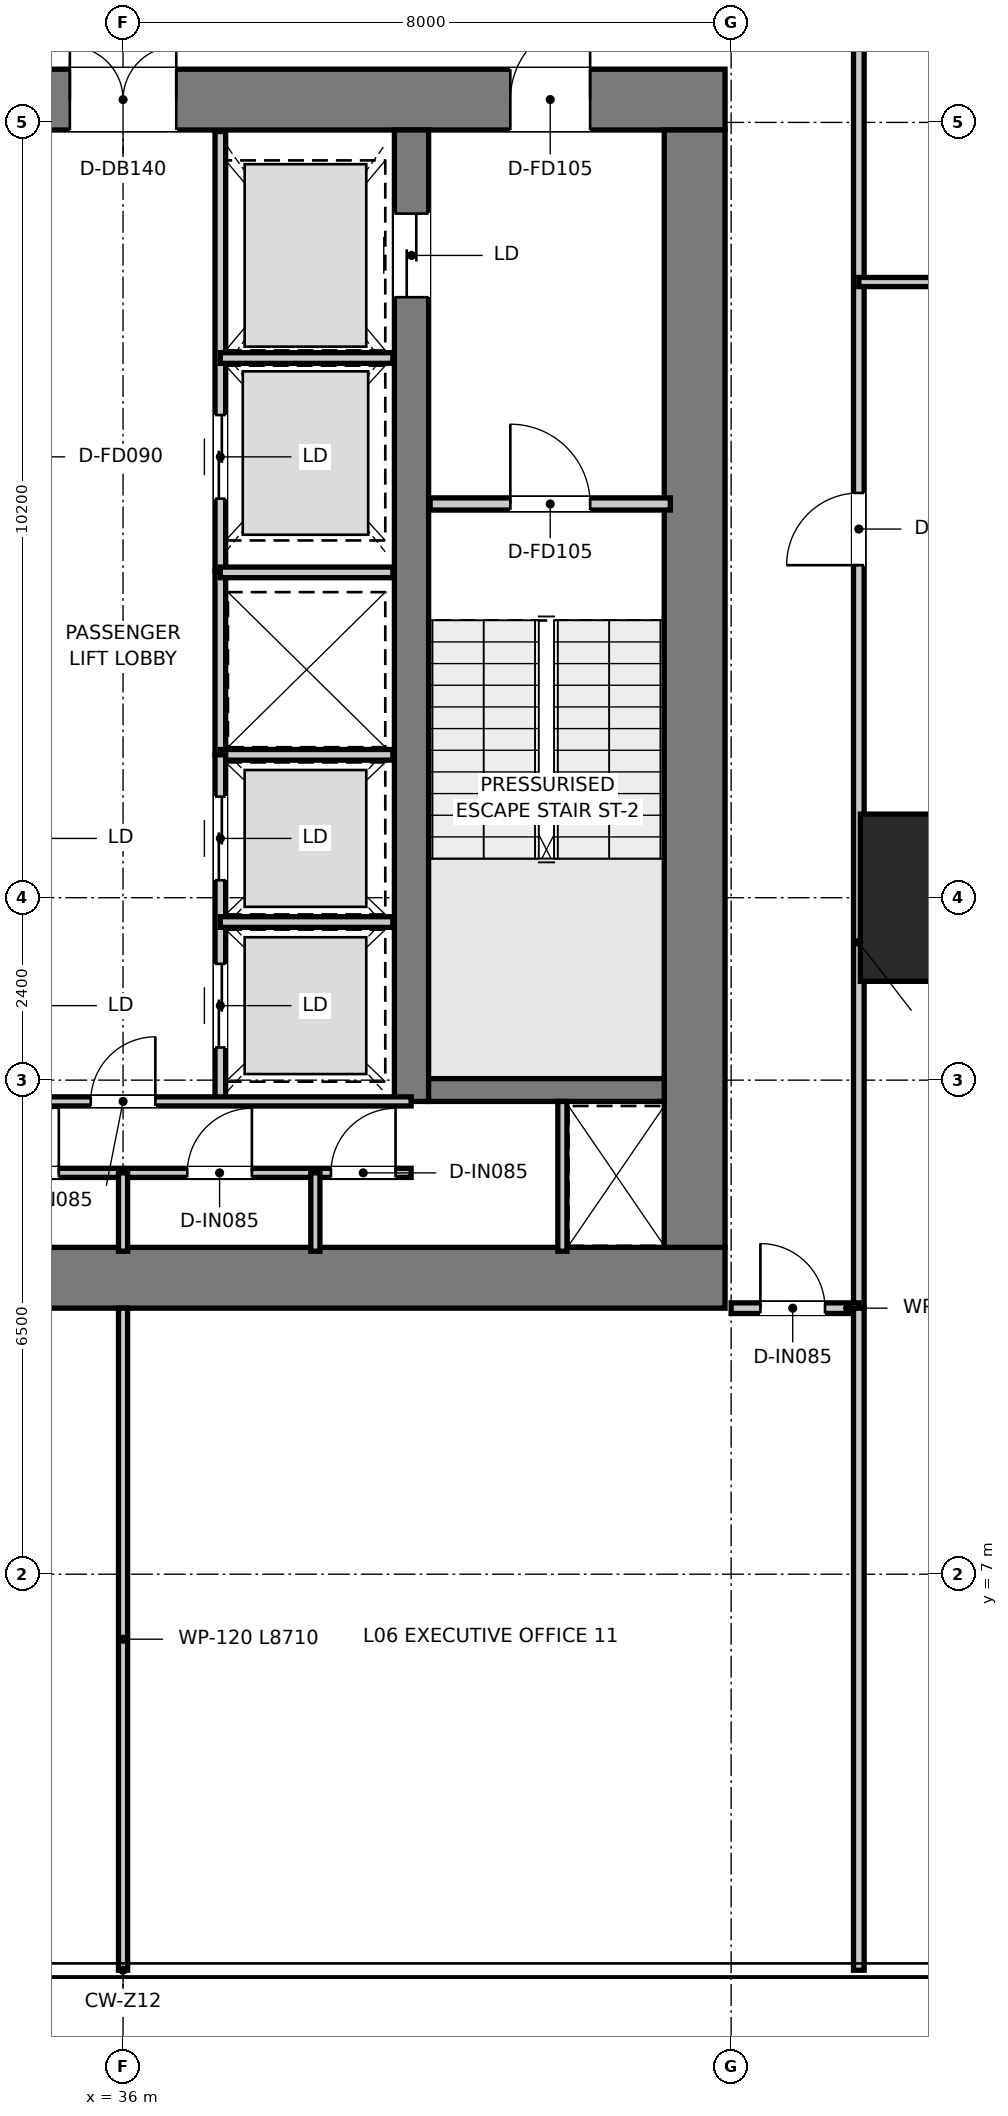
"""IFC4 building model, lengths in metres.
Left out: names, types, materials, properties, quantities, classifications, styles, units other than length and angle.
Written with IfcOpenShell. Run it as: python <this file> out.ifc"""

import sys

from ifc_helpers import new_model, si_unit, direction, frame, frame_2d, origin, origin_2d, place, context, subcontext, project, spatial, rectangle, extrude, source, transform, mapped, element, fill, save


model = new_model("IFC4")
c1 = context("Model", 3, precision=1e-05, world=origin(), true_north=direction((0.0, 1.0)))
c2 = subcontext(c1, "Body", "Model", "MODEL_VIEW")
j1 = project(units=[si_unit("LENGTHUNIT", "METRE"), si_unit("PLANEANGLEUNIT", "RADIAN")], contexts=[c1])
p1 = place(None, origin())
s1 = spatial("IfcSite", under=j1, at=p1, CompositionType="ELEMENT")
p2 = place(p1, origin())
s2 = spatial("IfcBuilding", under=s1, at=p2, CompositionType="ELEMENT")
p3 = place(p2, frame((0.0, 0.0, 28.95)))
s3 = spatial("IfcBuildingStorey", under=s2, at=p3, CompositionType="ELEMENT", Elevation=28.95)
p4 = place(p3, frame((28.08, 10.9, 0.0), z_axis=(0.0, 0.0, 1.0), x_axis=(1.0, 0.0, 0.0)))
e1 = element("IfcWall", 1, at=p4, inside=s3, PredefinedType="SHEAR", context=c2, shape_type="SweptSolid", body=[
    extrude(rectangle(XDim=15.84, YDim=0.8, at=frame_2d((7.92, 0.0))), origin(), (0.0, 0.0, 1.0), 3.95),
])
p5 = place(p3, frame((28.08, 26.4, 0.0), z_axis=(0.0, 0.0, 1.0), x_axis=(1.0, 0.0, 0.0)))
e2 = element("IfcWall", 2, at=p5, inside=s3, PredefinedType="SHEAR", context=c2, shape_type="SweptSolid", body=[
    extrude(rectangle(XDim=15.84, YDim=0.8, at=frame_2d((7.92, 0.0))), origin(), (0.0, 0.0, 1.0), 3.95),
])
p6 = place(p5, frame((7.22, 0.0, 0.0)))
e3 = element("IfcOpeningElement", 3, at=p6, cuts=e2, PredefinedType="OPENING", context=c2, shape_type="SweptSolid", body=[
    extrude(rectangle(XDim=1.4, YDim=2.2, at=frame_2d((0.7, 1.1))), frame((0.0, 0.41, 0.0), z_axis=(0.0, -1.0, 0.0), x_axis=(1.0, 0.0, 0.0)), (0.0, 0.0, 1.0), 0.82),
])
p7 = place(p5, frame((1.775, 0.0, 0.0)))
e4 = element("IfcOpeningElement", 4, at=p7, cuts=e2, PredefinedType="OPENING", context=c2, shape_type="SweptSolid", body=[
    extrude(rectangle(XDim=1.05, YDim=2.1, at=frame_2d((0.525, 1.05))), frame((0.0, 0.41, 0.0), z_axis=(0.0, -1.0, 0.0), x_axis=(1.0, 0.0, 0.0)), (0.0, 0.0, 1.0), 0.82),
])
p8 = place(p5, frame((13.015, 0.0, 0.0)))
e5 = element("IfcOpeningElement", 5, at=p8, cuts=e2, PredefinedType="OPENING", context=c2, shape_type="SweptSolid", body=[
    extrude(rectangle(XDim=1.05, YDim=2.1, at=frame_2d((0.525, 1.05))), frame((0.0, 0.41, 0.0), z_axis=(0.0, -1.0, 0.0), x_axis=(1.0, 0.0, 0.0)), (0.0, 0.0, 1.0), 0.82),
])
p9 = place(p3, frame((43.52, 11.3, 0.0), z_axis=(0.0, 0.0, 1.0), x_axis=(0.0, 1.0, 0.0)))
e6 = element("IfcWall", 6, at=p9, inside=s3, PredefinedType="SHEAR", context=c2, shape_type="SweptSolid", body=[
    extrude(rectangle(XDim=14.7, YDim=0.8, at=frame_2d((7.35, 0.0))), origin(), (0.0, 0.0, 1.0), 3.95),
])
p10 = place(p3, frame((39.795, 13.22, 0.0), z_axis=(0.0, 0.0, 1.0), x_axis=(0.0, 1.0, 0.0)))
e7 = element("IfcWall", 7, at=p10, inside=s3, PredefinedType="SHEAR", context=c2, shape_type="SweptSolid", body=[
    extrude(rectangle(XDim=12.78, YDim=0.45, at=frame_2d((6.39, 0.0))), origin(), (0.0, 0.0, 1.0), 3.95),
])
p11 = place(p10, frame((10.58, 0.0, 0.0)))
e8 = element("IfcOpeningElement", 8, at=p11, cuts=e7, PredefinedType="OPENING", context=c2, shape_type="SweptSolid", body=[
    extrude(rectangle(XDim=1.1, YDim=2.15, at=frame_2d((0.55, 1.075))), frame((0.0, 0.235, 0.0), z_axis=(0.0, -1.0, 0.0), x_axis=(1.0, 0.0, 0.0)), (0.0, 0.0, 1.0), 0.47),
])
p12 = place(p3, frame((40.02, 13.37, 0.0), z_axis=(0.0, 0.0, 1.0), x_axis=(1.0, 0.0, 0.0)))
e9 = element("IfcWall", 9, at=p12, inside=s3, PredefinedType="SHEAR", context=c2, shape_type="SweptSolid", body=[
    extrude(rectangle(XDim=3.1, YDim=0.3, at=frame_2d((1.55, 0.0))), origin(), (0.0, 0.0, 1.0), 3.95),
])
m1 = source(origin(), c2, "Body", "SweptSolid", [
    extrude(rectangle(XDim=2.2, YDim=2.2, at=origin_2d()), origin(), (0.0, 0.0, 1.0), 3.95),
])
p13 = place(p3, frame((46.8, 15.9, 0.0), z_axis=(0.0, 0.0, 1.0), x_axis=(1.0, 0.0, 0.0)))
e10 = element("IfcColumn", 10, at=p13, inside=s3, PredefinedType="USERDEFINED", context=c2, shape_type="MappedRepresentation", body=[
    mapped(m1, transform((0.0, 0.0, 0.0), x_axis=(1.0, 0.0, 0.0), y_axis=(0.0, 1.0, 0.0), z_axis=(0.0, 0.0, 1.0), scale=1.0)),
])
p14 = place(p3, frame((40.04, 21.08, 0.0), z_axis=(0.0, 0.0, 1.0), x_axis=(1.0, 0.0, 0.0)))
e11 = element("IfcWall", 11, at=p14, inside=s3, PredefinedType="PARTITIONING", context=c2, shape_type="SweptSolid", body=[
    extrude(rectangle(XDim=3.16, YDim=0.16, at=frame_2d((1.58, 0.0))), origin(), (0.0, 0.0, 1.0), 3.67),
])
p15 = place(p14, frame((1.055, 0.0, 0.0)))
e12 = element("IfcOpeningElement", 12, at=p15, cuts=e11, PredefinedType="OPENING", context=c2, shape_type="SweptSolid", body=[
    extrude(rectangle(XDim=1.05, YDim=2.1, at=frame_2d((0.525, 1.05))), frame((0.0, 0.09, 0.0), z_axis=(0.0, -1.0, 0.0), x_axis=(1.0, 0.0, 0.0)), (0.0, 0.0, 1.0), 0.18),
])
p16 = place(p3, frame((37.28, 20.2, 0.0), z_axis=(0.0, 0.0, 1.0), x_axis=(0.0, 1.0, 0.0)))
e13 = element("IfcWall", 13, at=p16, inside=s3, PredefinedType="PARTITIONING", context=c2, shape_type="SweptSolid", body=[
    extrude(rectangle(XDim=5.78, YDim=0.14, at=frame_2d((2.89, 0.0))), origin(), (0.0, 0.0, 1.0), 2.47),
])
p17 = place(p16, frame((0.95, 0.0, 0.0)))
e14 = element("IfcOpeningElement", 14, at=p17, cuts=e13, PredefinedType="OPENING", context=c2, shape_type="SweptSolid", body=[
    extrude(rectangle(XDim=1.1, YDim=2.15, at=frame_2d((0.55, 1.075))), frame((0.0, 0.08, 0.0), z_axis=(0.0, -1.0, 0.0), x_axis=(1.0, 0.0, 0.0)), (0.0, 0.0, 1.0), 0.16),
])
p18 = place(p3, frame((37.28, 23.0, 0.0), z_axis=(0.0, 0.0, 1.0), x_axis=(1.0, 0.0, 0.0)))
e15 = element("IfcWall", 15, at=p18, inside=s3, PredefinedType="PARTITIONING", context=c2, shape_type="SweptSolid", body=[
    extrude(rectangle(XDim=2.27, YDim=0.14, at=frame_2d((1.135, 0.0))), origin(), (0.0, 0.0, 1.0), 2.47),
])
p19 = place(p3, frame((37.28, 17.78, 0.0), z_axis=(0.0, 0.0, 1.0), x_axis=(0.0, 1.0, 0.0)))
e16 = element("IfcWall", 16, at=p19, inside=s3, PredefinedType="PARTITIONING", context=c2, shape_type="SweptSolid", body=[
    extrude(rectangle(XDim=2.42, YDim=0.14, at=frame_2d((1.21, 0.0))), origin(), (0.0, 0.0, 1.0), 3.67),
])
for number, where, z_axis, x_axis in (
    (17, (37.28, 17.78, 0.0), (0.0, 0.0, 1.0), (1.0, 0.0, 0.0)),
    (18, (37.28, 20.18, 0.0), (0.0, 0.0, 1.0), (1.0, 0.0, 0.0)),
):
    element("IfcWall", number, at=place(p3, frame(where, z_axis=z_axis, x_axis=x_axis)), inside=s3, PredefinedType="PARTITIONING", context=c2, shape_type="SweptSolid", body=[
        extrude(rectangle(XDim=2.27, YDim=0.14, at=frame_2d((1.135, 0.0))), origin(), (0.0, 0.0, 1.0), 3.67),
    ])
p20 = place(p3, frame((37.28, 13.22, 0.0), z_axis=(0.0, 0.0, 1.0), x_axis=(0.0, 1.0, 0.0)))
e19 = element("IfcWall", 19, at=p20, inside=s3, PredefinedType="PARTITIONING", context=c2, shape_type="SweptSolid", body=[
    extrude(rectangle(XDim=4.56, YDim=0.14, at=frame_2d((2.28, 0.0))), origin(), (0.0, 0.0, 1.0), 3.67),
])
p21 = place(p20, frame((0.71, 0.0, 0.0)))
e20 = element("IfcOpeningElement", 20, at=p21, cuts=e19, PredefinedType="OPENING", context=c2, shape_type="SweptSolid", body=[
    extrude(rectangle(XDim=1.1, YDim=2.15, at=frame_2d((0.55, 1.075))), frame((0.0, 0.08, 0.0), z_axis=(0.0, -1.0, 0.0), x_axis=(1.0, 0.0, 0.0)), (0.0, 0.0, 1.0), 0.16),
])
p22 = place(p20, frame((2.91, 0.0, 0.0)))
e21 = element("IfcOpeningElement", 21, at=p22, cuts=e19, PredefinedType="OPENING", context=c2, shape_type="SweptSolid", body=[
    extrude(rectangle(XDim=1.1, YDim=2.15, at=frame_2d((0.55, 1.075))), frame((0.0, 0.08, 0.0), z_axis=(0.0, -1.0, 0.0), x_axis=(1.0, 0.0, 0.0)), (0.0, 0.0, 1.0), 0.16),
])
p23 = place(p3, frame((37.28, 15.58, 0.0), z_axis=(0.0, 0.0, 1.0), x_axis=(1.0, 0.0, 0.0)))
e22 = element("IfcWall", 22, at=p23, inside=s3, PredefinedType="PARTITIONING", context=c2, shape_type="SweptSolid", body=[
    extrude(rectangle(XDim=2.27, YDim=0.14, at=frame_2d((1.135, 0.0))), origin(), (0.0, 0.0, 1.0), 3.67),
])
p24 = place(p3, frame((41.78, 11.25, 0.0), z_axis=(0.0, 0.0, 1.0), x_axis=(0.0, 1.0, 0.0)))
e23 = element("IfcWall", 23, at=p24, inside=s3, PredefinedType="PARTITIONING", context=c2, shape_type="SweptSolid", body=[
    extrude(rectangle(XDim=1.97, YDim=0.12, at=frame_2d((0.985, 0.0))), origin(), (0.0, 0.0, 1.0), 3.67),
])
p25 = place(p3, frame((32.21, 13.22, 0.0), z_axis=(0.0, 0.0, 1.0), x_axis=(1.0, 0.0, 0.0)))
e24 = element("IfcWall", 24, at=p25, inside=s3, PredefinedType="PARTITIONING", context=c2, shape_type="SweptSolid", body=[
    extrude(rectangle(XDim=7.58, YDim=0.12, at=frame_2d((3.79, 0.0))), origin(), (0.0, 0.0, 1.0), 3.67),
])
p26 = place(p25, frame((3.365, 0.0, 0.0)))
e25 = element("IfcOpeningElement", 25, at=p26, cuts=e24, PredefinedType="OPENING", context=c2, shape_type="SweptSolid", body=[
    extrude(rectangle(XDim=0.85, YDim=2.1, at=frame_2d((0.425, 1.05))), frame((0.0, 0.07, 0.0), z_axis=(0.0, -1.0, 0.0), x_axis=(1.0, 0.0, 0.0)), (0.0, 0.0, 1.0), 0.14),
])
p27 = place(p3, frame((32.21, 12.28, 0.0), z_axis=(0.0, 0.0, 1.0), x_axis=(1.0, 0.0, 0.0)))
e26 = element("IfcWall", 26, at=p27, inside=s3, PredefinedType="PARTITIONING", context=c2, shape_type="SweptSolid", body=[
    extrude(rectangle(XDim=7.58, YDim=0.12, at=frame_2d((3.79, 0.0))), origin(), (0.0, 0.0, 1.0), 3.67),
])
p28 = place(p27, frame((0.205, 0.0, 0.0)))
e27 = element("IfcOpeningElement", 27, at=p28, cuts=e26, PredefinedType="OPENING", context=c2, shape_type="SweptSolid", body=[
    extrude(rectangle(XDim=0.85, YDim=2.1, at=frame_2d((0.425, 1.05))), frame((0.0, 0.07, 0.0), z_axis=(0.0, -1.0, 0.0), x_axis=(1.0, 0.0, 0.0)), (0.0, 0.0, 1.0), 0.14),
])
p29 = place(p27, frame((2.095, 0.0, 0.0)))
e28 = element("IfcOpeningElement", 28, at=p29, cuts=e26, PredefinedType="OPENING", context=c2, shape_type="SweptSolid", body=[
    extrude(rectangle(XDim=0.85, YDim=2.1, at=frame_2d((0.425, 1.05))), frame((0.0, 0.07, 0.0), z_axis=(0.0, -1.0, 0.0), x_axis=(1.0, 0.0, 0.0)), (0.0, 0.0, 1.0), 0.14),
])
p30 = place(p27, frame((4.635, 0.0, 0.0)))
e29 = element("IfcOpeningElement", 29, at=p30, cuts=e26, PredefinedType="OPENING", context=c2, shape_type="SweptSolid", body=[
    extrude(rectangle(XDim=0.85, YDim=2.1, at=frame_2d((0.425, 1.05))), frame((0.0, 0.07, 0.0), z_axis=(0.0, -1.0, 0.0), x_axis=(1.0, 0.0, 0.0)), (0.0, 0.0, 1.0), 0.14),
])
p31 = place(p27, frame((6.525, 0.0, 0.0)))
e30 = element("IfcOpeningElement", 30, at=p31, cuts=e26, PredefinedType="OPENING", context=c2, shape_type="SweptSolid", body=[
    extrude(rectangle(XDim=0.85, YDim=2.1, at=frame_2d((0.425, 1.05))), frame((0.0, 0.07, 0.0), z_axis=(0.0, -1.0, 0.0), x_axis=(1.0, 0.0, 0.0)), (0.0, 0.0, 1.0), 0.14),
])
for number, where, z_axis, x_axis in (
    (31, (36.0, 11.25, 0.0), (0.0, 0.0, 1.0), (0.0, 1.0, 0.0)),
    (32, (38.53, 11.25, 0.0), (0.0, 0.0, 1.0), (0.0, 1.0, 0.0)),
):
    element("IfcWall", number, at=place(p3, frame(where, z_axis=z_axis, x_axis=x_axis)), inside=s3, PredefinedType="PARTITIONING", context=c2, shape_type="SweptSolid", body=[
        extrude(rectangle(XDim=1.03, YDim=0.12, at=frame_2d((0.515, 0.0))), origin(), (0.0, 0.0, 1.0), 3.67),
    ])
p32 = place(p3, frame((45.68, 10.5, 0.0), z_axis=(0.0, 0.0, 1.0), x_axis=(0.0, 1.0, 0.0)))
e33 = element("IfcWall", 33, at=p32, inside=s3, PredefinedType="PARTITIONING", context=c2, shape_type="SweptSolid", body=[
    extrude(rectangle(XDim=25.62, YDim=0.14, at=frame_2d((12.81, 0.0))), origin(), (0.0, 0.0, 1.0), 2.97),
])
p33 = place(p32, frame((9.775, 0.0, 0.0)))
e34 = element("IfcOpeningElement", 34, at=p33, cuts=e33, PredefinedType="OPENING", context=c2, shape_type="SweptSolid", body=[
    extrude(rectangle(XDim=0.95, YDim=2.1, at=frame_2d((0.475, 1.05))), frame((0.0, 0.08, 0.0), z_axis=(0.0, -1.0, 0.0), x_axis=(1.0, 0.0, 0.0)), (0.0, 0.0, 1.0), 0.16),
])
p34 = place(p32, frame((18.375, 0.0, 0.0)))
e35 = element("IfcOpeningElement", 35, at=p34, cuts=e33, PredefinedType="OPENING", context=c2, shape_type="SweptSolid", body=[
    extrude(rectangle(XDim=0.95, YDim=2.1, at=frame_2d((0.475, 1.05))), frame((0.0, 0.08, 0.0), z_axis=(0.0, -1.0, 0.0), x_axis=(1.0, 0.0, 0.0)), (0.0, 0.0, 1.0), 0.16),
])
p35 = place(p3, frame((44.0, 10.5, 0.0), z_axis=(0.0, 0.0, 1.0), x_axis=(1.0, 0.0, 0.0)))
e36 = element("IfcWall", 36, at=p35, inside=s3, PredefinedType="PARTITIONING", context=c2, shape_type="SweptSolid", body=[
    extrude(rectangle(XDim=1.68, YDim=0.14, at=frame_2d((0.84, 0.0))), origin(), (0.0, 0.0, 1.0), 3.67),
])
p36 = place(p35, frame((0.385, 0.0, 0.0)))
e37 = element("IfcOpeningElement", 37, at=p36, cuts=e36, PredefinedType="OPENING", context=c2, shape_type="SweptSolid", body=[
    extrude(rectangle(XDim=0.85, YDim=2.1, at=frame_2d((0.425, 1.05))), frame((0.0, 0.08, 0.0), z_axis=(0.0, -1.0, 0.0), x_axis=(1.0, 0.0, 0.0)), (0.0, 0.0, 1.0), 0.16),
])
p37 = place(p3, frame((45.68, 1.79, 0.0), z_axis=(0.0, 0.0, 1.0), x_axis=(0.0, 1.0, 0.0)))
e38 = element("IfcWall", 38, at=p37, inside=s3, PredefinedType="PARTITIONING", context=c2, shape_type="SweptSolid", body=[
    extrude(rectangle(XDim=8.71, YDim=0.14, at=frame_2d((4.355, 0.0))), origin(), (0.0, 0.0, 1.0), 3.67),
])
p38 = place(p3, frame((45.68, 24.0, 0.0), z_axis=(0.0, 0.0, 1.0), x_axis=(1.0, 0.0, 0.0)))
e39 = element("IfcWall", 39, at=p38, inside=s3, PredefinedType="PARTITIONING", context=c2, shape_type="SweptSolid", body=[
    extrude(rectangle(XDim=15.23, YDim=0.12, at=frame_2d((7.615, 0.0))), origin(), (0.0, 0.0, 1.0), 2.97),
])
p39 = place(p3, frame((36.0, 1.79, 0.0), z_axis=(0.0, 0.0, 1.0), x_axis=(0.0, 1.0, 0.0)))
e40 = element("IfcWall", 40, at=p39, inside=s3, PredefinedType="PARTITIONING", context=c2, shape_type="SweptSolid", body=[
    extrude(rectangle(XDim=8.71, YDim=0.12, at=frame_2d((4.355, 0.0))), origin(), (0.0, 0.0, 1.0), 3.67),
])
p40 = place(p15, origin())
e41 = element("IfcDoor", 41, at=p40, inside=s3, OperationType="SINGLE_SWING_LEFT", PredefinedType="DOOR", context=c2, shape_type="SweptSolid", body=[
    extrude(rectangle(XDim=1.05, YDim=2.1, at=frame_2d((0.525, 1.05))), frame((0.0, 0.025, 0.0), z_axis=(0.0, -1.0, 0.0), x_axis=(1.0, 0.0, 0.0)), (0.0, 0.0, 1.0), 0.05),
])
fill(e12, e41)
p41 = place(p6, origin())
e42 = element("IfcDoor", 42, at=p41, inside=s3, OperationType="DOUBLE_DOOR_SINGLE_SWING", PredefinedType="DOOR", context=c2, shape_type="SweptSolid", body=[
    extrude(rectangle(XDim=1.4, YDim=2.2, at=frame_2d((0.7, 1.1))), frame((0.0, 0.025, 0.0), z_axis=(0.0, -1.0, 0.0), x_axis=(1.0, 0.0, 0.0)), (0.0, 0.0, 1.0), 0.05),
])
fill(e3, e42)
p42 = place(p8, origin())
e43 = element("IfcDoor", 43, at=p42, inside=s3, OperationType="SINGLE_SWING_RIGHT", PredefinedType="DOOR", context=c2, shape_type="SweptSolid", body=[
    extrude(rectangle(XDim=1.05, YDim=2.1, at=frame_2d((0.525, 1.05))), frame((0.0, 0.025, 0.0), z_axis=(0.0, -1.0, 0.0), x_axis=(1.0, 0.0, 0.0)), (0.0, 0.0, 1.0), 0.05),
])
fill(e5, e43)
p43 = place(p11, origin())
e44 = element("IfcDoor", 44, at=p43, inside=s3, OperationType="DOUBLE_DOOR_SLIDING", PredefinedType="DOOR", context=c2, shape_type="SweptSolid", body=[
    extrude(rectangle(XDim=1.1, YDim=2.15, at=frame_2d((0.55, 1.075))), frame((0.0, 0.025, 0.0), z_axis=(0.0, -1.0, 0.0), x_axis=(1.0, 0.0, 0.0)), (0.0, 0.0, 1.0), 0.05),
])
fill(e8, e44)
p44 = place(p17, origin())
e45 = element("IfcDoor", 45, at=p44, inside=s3, OperationType="DOUBLE_DOOR_SLIDING", PredefinedType="DOOR", context=c2, shape_type="SweptSolid", body=[
    extrude(rectangle(XDim=1.1, YDim=2.15, at=frame_2d((0.55, 1.075))), frame((0.0, 0.025, 0.0), z_axis=(0.0, -1.0, 0.0), x_axis=(1.0, 0.0, 0.0)), (0.0, 0.0, 1.0), 0.05),
])
fill(e14, e45)
p45 = place(p21, origin())
e46 = element("IfcDoor", 46, at=p45, inside=s3, OperationType="DOUBLE_DOOR_SLIDING", PredefinedType="DOOR", context=c2, shape_type="SweptSolid", body=[
    extrude(rectangle(XDim=1.1, YDim=2.15, at=frame_2d((0.55, 1.075))), frame((0.0, 0.025, 0.0), z_axis=(0.0, -1.0, 0.0), x_axis=(1.0, 0.0, 0.0)), (0.0, 0.0, 1.0), 0.05),
])
fill(e20, e46)
p46 = place(p22, origin())
e47 = element("IfcDoor", 47, at=p46, inside=s3, OperationType="DOUBLE_DOOR_SLIDING", PredefinedType="DOOR", context=c2, shape_type="SweptSolid", body=[
    extrude(rectangle(XDim=1.1, YDim=2.15, at=frame_2d((0.55, 1.075))), frame((0.0, 0.025, 0.0), z_axis=(0.0, -1.0, 0.0), x_axis=(1.0, 0.0, 0.0)), (0.0, 0.0, 1.0), 0.05),
])
fill(e21, e47)
p47 = place(p26, origin())
e48 = element("IfcDoor", 48, at=p47, inside=s3, OperationType="SINGLE_SWING_RIGHT", PredefinedType="DOOR", context=c2, shape_type="SweptSolid", body=[
    extrude(rectangle(XDim=0.85, YDim=2.1, at=frame_2d((0.425, 1.05))), frame((0.0, 0.025, 0.0), z_axis=(0.0, -1.0, 0.0), x_axis=(1.0, 0.0, 0.0)), (0.0, 0.0, 1.0), 0.05),
])
fill(e25, e48)
p48 = place(p29, origin())
e49 = element("IfcDoor", 49, at=p48, inside=s3, OperationType="SINGLE_SWING_RIGHT", PredefinedType="DOOR", context=c2, shape_type="SweptSolid", body=[
    extrude(rectangle(XDim=0.85, YDim=2.1, at=frame_2d((0.425, 1.05))), frame((0.0, 0.025, 0.0), z_axis=(0.0, -1.0, 0.0), x_axis=(1.0, 0.0, 0.0)), (0.0, 0.0, 1.0), 0.05),
])
fill(e28, e49)
p49 = place(p30, origin())
e50 = element("IfcDoor", 50, at=p49, inside=s3, OperationType="SINGLE_SWING_RIGHT", PredefinedType="DOOR", context=c2, shape_type="SweptSolid", body=[
    extrude(rectangle(XDim=0.85, YDim=2.1, at=frame_2d((0.425, 1.05))), frame((0.0, 0.025, 0.0), z_axis=(0.0, -1.0, 0.0), x_axis=(1.0, 0.0, 0.0)), (0.0, 0.0, 1.0), 0.05),
])
fill(e29, e50)
p50 = place(p31, origin())
e51 = element("IfcDoor", 51, at=p50, inside=s3, OperationType="SINGLE_SWING_RIGHT", PredefinedType="DOOR", context=c2, shape_type="SweptSolid", body=[
    extrude(rectangle(XDim=0.85, YDim=2.1, at=frame_2d((0.425, 1.05))), frame((0.0, 0.025, 0.0), z_axis=(0.0, -1.0, 0.0), x_axis=(1.0, 0.0, 0.0)), (0.0, 0.0, 1.0), 0.05),
])
fill(e30, e51)
p51 = place(p33, origin())
e52 = element("IfcDoor", 52, at=p51, inside=s3, OperationType="SINGLE_SWING_LEFT", PredefinedType="DOOR", context=c2, shape_type="SweptSolid", body=[
    extrude(rectangle(XDim=0.95, YDim=2.1, at=frame_2d((0.475, 1.05))), frame((0.0, 0.025, 0.0), z_axis=(0.0, -1.0, 0.0), x_axis=(1.0, 0.0, 0.0)), (0.0, 0.0, 1.0), 0.05),
])
fill(e34, e52)
p52 = place(p36, origin())
e53 = element("IfcDoor", 53, at=p52, inside=s3, OperationType="SINGLE_SWING_LEFT", PredefinedType="DOOR", context=c2, shape_type="SweptSolid", body=[
    extrude(rectangle(XDim=0.85, YDim=2.1, at=frame_2d((0.425, 1.05))), frame((0.0, 0.025, 0.0), z_axis=(0.0, -1.0, 0.0), x_axis=(1.0, 0.0, 0.0)), (0.0, 0.0, 1.0), 0.05),
])
fill(e37, e53)
save(model, sys.argv[1])
